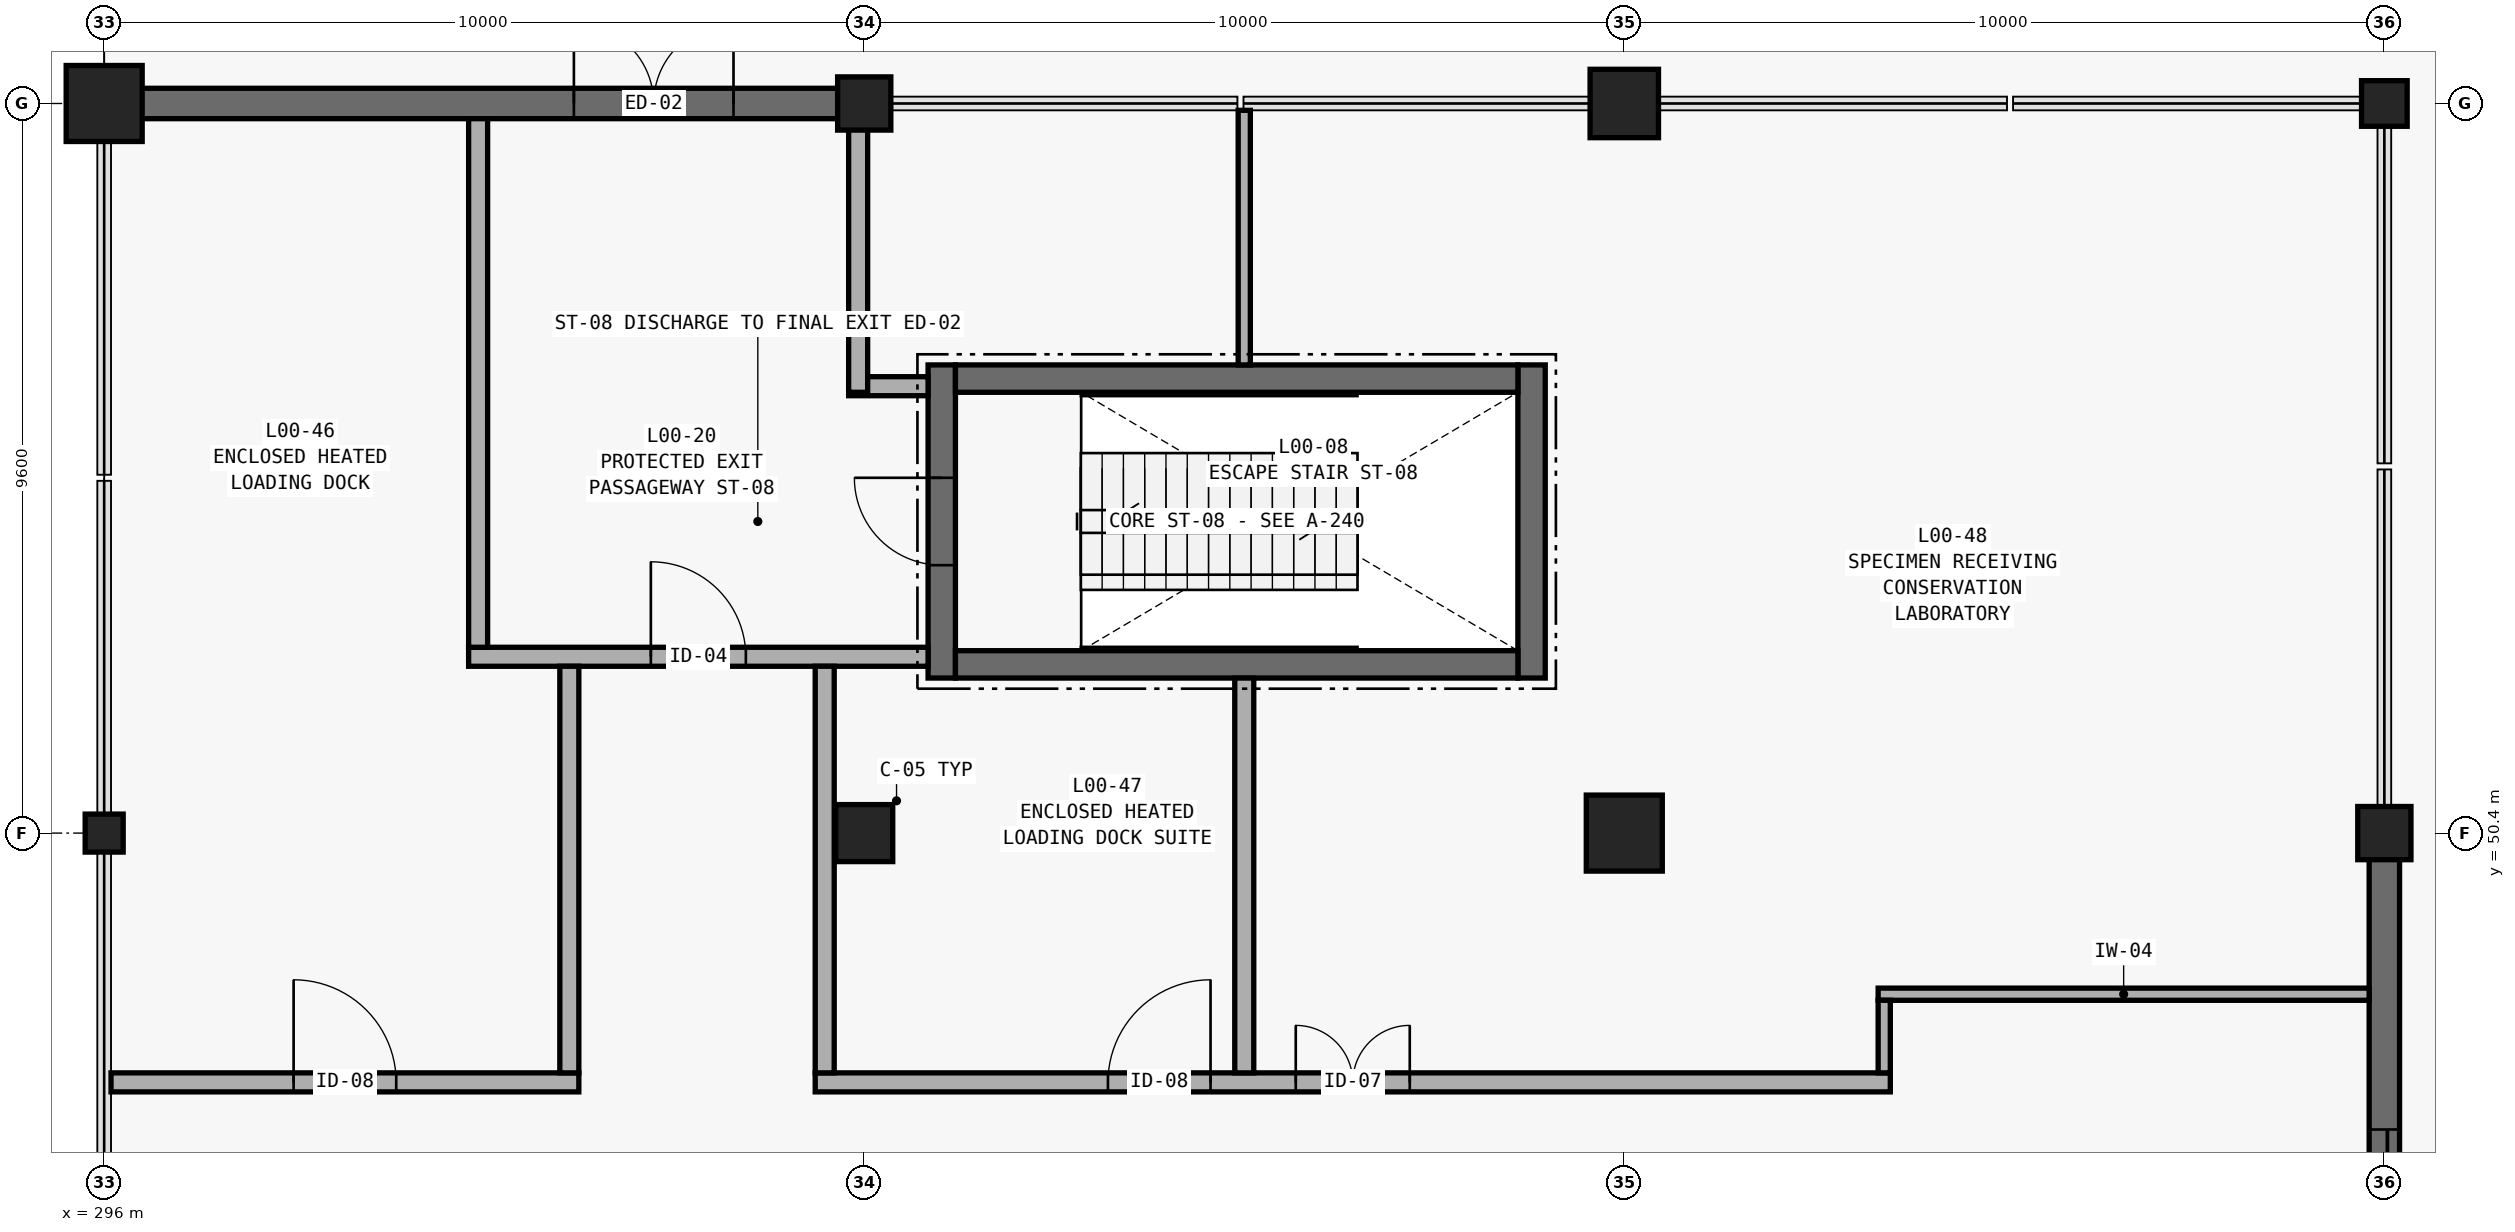
"""IFC4 building model, lengths in metres.
Left out: names, types, materials, properties, quantities, classifications, styles, units other than length and angle.
Written with IfcOpenShell. Run it as: python <this file> out.ifc"""

import sys

from ifc_helpers import new_model, si_unit, direction, frame, frame_2d, origin, origin_2d, place, context, subcontext, project, spatial, rectangle, extrude, element, fill, save


model = new_model("IFC4")
c1 = context("Model", 3, precision=1e-05, world=origin(), true_north=direction((0.0, 1.0)))
c2 = subcontext(c1, "Body", "Model", "MODEL_VIEW")
j1 = project(units=[si_unit("LENGTHUNIT", "METRE"), si_unit("PLANEANGLEUNIT", "RADIAN")], contexts=[c1])
p1 = place(None, origin())
s1 = spatial("IfcSite", under=j1, at=p1, CompositionType="ELEMENT")
p2 = place(p1, origin())
s2 = spatial("IfcBuilding", under=s1, at=p2, CompositionType="ELEMENT")
p3 = place(p2, origin())
s3 = spatial("IfcBuildingStorey", under=s2, at=p3, CompositionType="ELEMENT", Elevation=0.0)
p4 = place(p3, frame((296.0, 50.4, 0.0), z_axis=(0.0, 0.0, 1.0), x_axis=(1.0, 0.0, 0.0)))
e1 = element("IfcColumn", 1, at=p4, inside=s3, PredefinedType="COLUMN", context=c2, shape_type="SweptSolid", body=[
    extrude(rectangle(XDim=0.5, YDim=0.5, at=origin_2d()), origin(), (0.0, 0.0, 1.0), 4.8),
])
p5 = place(p3, frame((296.0, 60.0, 0.0), z_axis=(0.0, 0.0, 1.0), x_axis=(1.0, 0.0, 0.0)))
e2 = element("IfcColumn", 2, at=p5, inside=s3, PredefinedType="COLUMN", context=c2, shape_type="SweptSolid", body=[
    extrude(rectangle(XDim=1.0, YDim=1.0, at=origin_2d()), origin(), (0.0, 0.0, 1.0), 4.8),
])
p6 = place(p3, frame((306.0, 50.4, 0.0), z_axis=(0.0, 0.0, 1.0), x_axis=(1.0, 0.0, 0.0)))
e3 = element("IfcColumn", 3, at=p6, inside=s3, PredefinedType="COLUMN", context=c2, shape_type="SweptSolid", body=[
    extrude(rectangle(XDim=0.75, YDim=0.75, at=origin_2d()), origin(), (0.0, 0.0, 1.0), 4.8),
])
p7 = place(p3, frame((306.0, 60.0, 0.0), z_axis=(0.0, 0.0, 1.0), x_axis=(1.0, 0.0, 0.0)))
e4 = element("IfcColumn", 4, at=p7, inside=s3, PredefinedType="COLUMN", context=c2, shape_type="SweptSolid", body=[
    extrude(rectangle(XDim=0.7, YDim=0.7, at=origin_2d()), origin(), (0.0, 0.0, 1.0), 4.8),
])
p8 = place(p3, frame((316.0, 50.4, 0.0), z_axis=(0.0, 0.0, 1.0), x_axis=(1.0, 0.0, 0.0)))
e5 = element("IfcColumn", 5, at=p8, inside=s3, PredefinedType="COLUMN", context=c2, shape_type="SweptSolid", body=[
    extrude(rectangle(XDim=1.0, YDim=1.0, at=origin_2d()), origin(), (0.0, 0.0, 1.0), 4.8),
])
p9 = place(p3, frame((316.0, 60.0, 0.0), z_axis=(0.0, 0.0, 1.0), x_axis=(1.0, 0.0, 0.0)))
e6 = element("IfcColumn", 6, at=p9, inside=s3, PredefinedType="COLUMN", context=c2, shape_type="SweptSolid", body=[
    extrude(rectangle(XDim=0.9, YDim=0.9, at=origin_2d()), origin(), (0.0, 0.0, 1.0), 4.8),
])
p10 = place(p3, frame((326.0, 50.4, 0.0), z_axis=(0.0, 0.0, 1.0), x_axis=(1.0, 0.0, 0.0)))
e7 = element("IfcColumn", 7, at=p10, inside=s3, PredefinedType="COLUMN", context=c2, shape_type="SweptSolid", body=[
    extrude(rectangle(XDim=0.7, YDim=0.7, at=origin_2d()), origin(), (0.0, 0.0, 1.0), 4.8),
])
p11 = place(p3, frame((326.0, 60.0, 0.0), z_axis=(0.0, 0.0, 1.0), x_axis=(1.0, 0.0, 0.0)))
e8 = element("IfcColumn", 8, at=p11, inside=s3, PredefinedType="COLUMN", context=c2, shape_type="SweptSolid", body=[
    extrude(rectangle(XDim=0.6, YDim=0.6, at=origin_2d()), origin(), (0.0, 0.0, 1.0), 4.8),
])
p12 = place(p3, frame((326.0, 38.22, 0.0), z_axis=(0.0, 0.0, 1.0), x_axis=(0.0, 1.0, 0.0)))
e9 = element("IfcWall", 9, at=p12, inside=s3, PredefinedType="STANDARD", context=c2, shape_type="SweptSolid", body=[
    extrude(rectangle(XDim=12.36, YDim=0.4, at=frame_2d((6.18, 0.0))), origin(), (0.0, 0.0, 1.0), 4.5),
])
p13 = place(p12, frame((4.08, 0.0, 0.0)))
e10 = element("IfcOpeningElement", 10, at=p13, cuts=e9, PredefinedType="OPENING", context=c2, shape_type="SweptSolid", body=[
    extrude(rectangle(XDim=4.2, YDim=2.95, at=frame_2d((2.1, 1.475))), frame((0.0, 0.215, 0.0), z_axis=(0.0, -1.0, 0.0), x_axis=(1.0, 0.0, 0.0)), (0.0, 0.0, 1.0), 0.43),
])
p14 = place(p3, frame((306.18, 60.0, 0.0), z_axis=(0.0, 0.0, 1.0), x_axis=(-1.0, 0.0, 0.0)))
e11 = element("IfcWall", 11, at=p14, inside=s3, PredefinedType="STANDARD", context=c2, shape_type="SweptSolid", body=[
    extrude(rectangle(XDim=10.36, YDim=0.4, at=frame_2d((5.18, 0.0))), origin(), (0.0, 0.0, 1.0), 4.5),
])
p15 = place(p14, frame((1.9, 0.0, 0.0)))
e12 = element("IfcOpeningElement", 12, at=p15, cuts=e11, PredefinedType="OPENING", context=c2, shape_type="SweptSolid", body=[
    extrude(rectangle(XDim=2.1, YDim=2.6, at=frame_2d((1.05, 1.3))), frame((0.0, 0.215, 0.0), z_axis=(0.0, -1.0, 0.0), x_axis=(1.0, 0.0, 0.0)), (0.0, 0.0, 1.0), 0.43),
])
p16 = place(p3, frame((307.02, 52.44, 0.0), z_axis=(0.0, 0.0, 1.0), x_axis=(0.0, 1.0, 0.0)))
e13 = element("IfcWall", 13, at=p16, inside=s3, PredefinedType="SHEAR", context=c2, shape_type="SweptSolid", body=[
    extrude(rectangle(XDim=4.12, YDim=0.36, at=frame_2d((2.06, 0.0))), origin(), (0.0, 0.0, 1.0), 4.5),
])
p17 = place(p16, frame((1.485, 0.0, 0.0)))
e14 = element("IfcOpeningElement", 14, at=p17, cuts=e13, PredefinedType="OPENING", context=c2, shape_type="SweptSolid", body=[
    extrude(rectangle(XDim=1.15, YDim=2.15, at=frame_2d((0.575, 1.075))), frame((0.0, 0.195, 0.0), z_axis=(0.0, -1.0, 0.0), x_axis=(1.0, 0.0, 0.0)), (0.0, 0.0, 1.0), 0.39),
])
p18 = place(p3, frame((314.78, 52.44, 0.0), z_axis=(0.0, 0.0, 1.0), x_axis=(0.0, 1.0, 0.0)))
e15 = element("IfcWall", 15, at=p18, inside=s3, PredefinedType="SHEAR", context=c2, shape_type="SweptSolid", body=[
    extrude(rectangle(XDim=4.12, YDim=0.36, at=frame_2d((2.06, 0.0))), origin(), (0.0, 0.0, 1.0), 4.5),
])
for number, where, z_axis, x_axis in (
    (16, (307.2, 56.38, 0.0), (0.0, 0.0, 1.0), (1.0, 0.0, 0.0)),
    (17, (307.2, 52.62, 0.0), (0.0, 0.0, 1.0), (1.0, 0.0, 0.0)),
):
    element("IfcWall", number, at=place(p3, frame(where, z_axis=z_axis, x_axis=x_axis)), inside=s3, PredefinedType="SHEAR", context=c2, shape_type="SweptSolid", body=[
        extrude(rectangle(XDim=7.4, YDim=0.36, at=frame_2d((3.7, 0.0))), origin(), (0.0, 0.0, 1.0), 4.5),
    ])
p19 = place(p3, frame((296.09, 47.12, 0.0), z_axis=(0.0, 0.0, 1.0), x_axis=(1.0, 0.0, 0.0)))
e18 = element("IfcWall", 18, at=p19, inside=s3, PredefinedType="PARTITIONING", context=c2, shape_type="SweptSolid", body=[
    extrude(rectangle(XDim=6.155, YDim=0.25, at=frame_2d((3.078, 0.0))), origin(), (0.0, 0.0, 1.0), 3.38),
])
p20 = place(p19, frame((2.403, 0.0, 0.0)))
e19 = element("IfcOpeningElement", 19, at=p20, cuts=e18, PredefinedType="OPENING", context=c2, shape_type="SweptSolid", body=[
    extrude(rectangle(XDim=1.35, YDim=2.2, at=frame_2d((0.675, 1.1))), frame((0.0, 0.14, 0.0), z_axis=(0.0, -1.0, 0.0), x_axis=(1.0, 0.0, 0.0)), (0.0, 0.0, 1.0), 0.28),
])
p21 = place(p3, frame((305.355, 47.12, 0.0), z_axis=(0.0, 0.0, 1.0), x_axis=(1.0, 0.0, 0.0)))
e20 = element("IfcWall", 20, at=p21, inside=s3, PredefinedType="PARTITIONING", context=c2, shape_type="SweptSolid", body=[
    extrude(rectangle(XDim=14.145, YDim=0.25, at=frame_2d((7.073, 0.0))), origin(), (0.0, 0.0, 1.0), 3.38),
])
p22 = place(p21, frame((3.851, 0.0, 0.0)))
e21 = element("IfcOpeningElement", 21, at=p22, cuts=e20, PredefinedType="OPENING", context=c2, shape_type="SweptSolid", body=[
    extrude(rectangle(XDim=1.35, YDim=2.2, at=frame_2d((0.675, 1.1))), frame((0.0, 0.14, 0.0), z_axis=(0.0, -1.0, 0.0), x_axis=(1.0, 0.0, 0.0)), (0.0, 0.0, 1.0), 0.28),
])
p23 = place(p21, frame((6.323, 0.0, 0.0)))
e22 = element("IfcOpeningElement", 22, at=p23, cuts=e20, PredefinedType="OPENING", context=c2, shape_type="SweptSolid", body=[
    extrude(rectangle(XDim=1.5, YDim=2.2, at=frame_2d((0.75, 1.1))), frame((0.0, 0.14, 0.0), z_axis=(0.0, -1.0, 0.0), x_axis=(1.0, 0.0, 0.0)), (0.0, 0.0, 1.0), 0.28),
])
p24 = place(p3, frame((319.34, 48.28, 0.0), z_axis=(0.0, 0.0, 1.0), x_axis=(1.0, 0.0, 0.0)))
e23 = element("IfcWall", 23, at=p24, inside=s3, PredefinedType="PARTITIONING", context=c2, shape_type="SweptSolid", body=[
    extrude(rectangle(XDim=6.46, YDim=0.16, at=frame_2d((3.23, 0.0))), origin(), (0.0, 0.0, 1.0), 3.38),
])
p25 = place(p3, frame((300.795, 52.72, 0.0), z_axis=(0.0, 0.0, 1.0), x_axis=(1.0, 0.0, 0.0)))
e24 = element("IfcWall", 24, at=p25, inside=s3, PredefinedType="PARTITIONING", context=c2, shape_type="SweptSolid", body=[
    extrude(rectangle(XDim=6.045, YDim=0.25, at=frame_2d((3.022, 0.0))), origin(), (0.0, 0.0, 1.0), 3.38),
])
p26 = place(p25, frame((2.397, 0.0, 0.0)))
e25 = element("IfcOpeningElement", 25, at=p26, cuts=e24, PredefinedType="OPENING", context=c2, shape_type="SweptSolid", body=[
    extrude(rectangle(XDim=1.25, YDim=2.15, at=frame_2d((0.625, 1.075))), frame((0.0, 0.14, 0.0), z_axis=(0.0, -1.0, 0.0), x_axis=(1.0, 0.0, 0.0)), (0.0, 0.0, 1.0), 0.28),
])
p27 = place(p3, frame((305.795, 56.28, 0.0), z_axis=(0.0, 0.0, 1.0), x_axis=(1.0, 0.0, 0.0)))
e26 = element("IfcWall", 26, at=p27, inside=s3, PredefinedType="PARTITIONING", context=c2, shape_type="SweptSolid", body=[
    extrude(rectangle(XDim=1.045, YDim=0.25, at=frame_2d((0.522, 0.0))), origin(), (0.0, 0.0, 1.0), 3.38),
])
p28 = place(p3, frame((300.92, 52.845, 0.0), z_axis=(0.0, 0.0, 1.0), x_axis=(0.0, 1.0, 0.0)))
e27 = element("IfcWall", 27, at=p28, inside=s3, PredefinedType="PARTITIONING", context=c2, shape_type="SweptSolid", body=[
    extrude(rectangle(XDim=6.955, YDim=0.25, at=frame_2d((3.478, 0.0))), origin(), (0.0, 0.0, 1.0), 3.38),
])
for number, where, z_axis, x_axis in (
    (28, (302.12, 47.245, 0.0), (0.0, 0.0, 1.0), (0.0, 1.0, 0.0)),
    (29, (305.48, 47.245, 0.0), (0.0, 0.0, 1.0), (0.0, 1.0, 0.0)),
):
    element("IfcWall", number, at=place(p3, frame(where, z_axis=z_axis, x_axis=x_axis)), inside=s3, PredefinedType="PARTITIONING", context=c2, shape_type="SweptSolid", body=[
        extrude(rectangle(XDim=5.35, YDim=0.25, at=frame_2d((2.675, 0.0))), origin(), (0.0, 0.0, 1.0), 3.38),
    ])
p29 = place(p3, frame((305.92, 56.2, 0.0), z_axis=(0.0, 0.0, 1.0), x_axis=(0.0, 1.0, 0.0)))
e30 = element("IfcWall", 30, at=p29, inside=s3, PredefinedType="PARTITIONING", context=c2, shape_type="SweptSolid", body=[
    extrude(rectangle(XDim=3.6, YDim=0.25, at=frame_2d((1.8, 0.0))), origin(), (0.0, 0.0, 1.0), 3.38),
])
p30 = place(p3, frame((311.0, 47.245, 0.0), z_axis=(0.0, 0.0, 1.0), x_axis=(0.0, 1.0, 0.0)))
e31 = element("IfcWall", 31, at=p30, inside=s3, PredefinedType="PARTITIONING", context=c2, shape_type="SweptSolid", body=[
    extrude(rectangle(XDim=5.195, YDim=0.25, at=frame_2d((2.597, 0.0))), origin(), (0.0, 0.0, 1.0), 3.38),
])
p31 = place(p3, frame((311.0, 56.56, 0.0), z_axis=(0.0, 0.0, 1.0), x_axis=(0.0, 1.0, 0.0)))
e32 = element("IfcWall", 32, at=p31, inside=s3, PredefinedType="PARTITIONING", context=c2, shape_type="SweptSolid", body=[
    extrude(rectangle(XDim=3.35, YDim=0.16, at=frame_2d((1.675, 0.0))), origin(), (0.0, 0.0, 1.0), 3.38),
])
p32 = place(p3, frame((319.42, 47.245, 0.0), z_axis=(0.0, 0.0, 1.0), x_axis=(0.0, 1.0, 0.0)))
e33 = element("IfcWall", 33, at=p32, inside=s3, PredefinedType="PARTITIONING", context=c2, shape_type="SweptSolid", body=[
    extrude(rectangle(XDim=0.955, YDim=0.16, at=frame_2d((0.478, 0.0))), origin(), (0.0, 0.0, 1.0), 3.38),
])
p33 = place(p13, frame((4.2, 0.0, 0.0), z_axis=(0.0, 0.0, 1.0), x_axis=(-1.0, 0.0, 0.0)))
e34 = element("IfcDoor", 34, at=p33, inside=s3, OperationType="ROLLINGUP", PredefinedType="GATE", context=c2, shape_type="SweptSolid", body=[
    extrude(rectangle(XDim=4.2, YDim=2.95, at=frame_2d((2.1, 1.475))), frame((0.0, 0.025, 0.0), z_axis=(0.0, -1.0, 0.0), x_axis=(1.0, 0.0, 0.0)), (0.0, 0.0, 1.0), 0.05),
])
fill(e10, e34)
p34 = place(p15, frame((2.1, 0.0, 0.0), z_axis=(0.0, 0.0, 1.0), x_axis=(-1.0, 0.0, 0.0)))
e35 = element("IfcDoor", 35, at=p34, inside=s3, OperationType="DOUBLE_DOOR_SINGLE_SWING", PredefinedType="DOOR", context=c2, shape_type="SweptSolid", body=[
    extrude(rectangle(XDim=2.1, YDim=2.6, at=frame_2d((1.05, 1.3))), frame((0.0, 0.025, 0.0), z_axis=(0.0, -1.0, 0.0), x_axis=(1.0, 0.0, 0.0)), (0.0, 0.0, 1.0), 0.05),
])
fill(e12, e35)
p35 = place(p17, origin())
e36 = element("IfcDoor", 36, at=p35, inside=s3, OperationType="SINGLE_SWING_RIGHT", PredefinedType="DOOR", context=c2, shape_type="SweptSolid", body=[
    extrude(rectangle(XDim=1.15, YDim=2.15, at=frame_2d((0.575, 1.075))), frame((0.0, 0.025, 0.0), z_axis=(0.0, -1.0, 0.0), x_axis=(1.0, 0.0, 0.0)), (0.0, 0.0, 1.0), 0.05),
])
fill(e14, e36)
p36 = place(p26, origin())
e37 = element("IfcDoor", 37, at=p36, inside=s3, OperationType="SINGLE_SWING_LEFT", PredefinedType="DOOR", context=c2, shape_type="SweptSolid", body=[
    extrude(rectangle(XDim=1.25, YDim=2.15, at=frame_2d((0.625, 1.075))), frame((0.0, 0.025, 0.0), z_axis=(0.0, -1.0, 0.0), x_axis=(1.0, 0.0, 0.0)), (0.0, 0.0, 1.0), 0.05),
])
fill(e25, e37)
p37 = place(p20, origin())
e38 = element("IfcDoor", 38, at=p37, inside=s3, OperationType="SINGLE_SWING_LEFT", PredefinedType="DOOR", context=c2, shape_type="SweptSolid", body=[
    extrude(rectangle(XDim=1.35, YDim=2.2, at=frame_2d((0.675, 1.1))), frame((0.0, 0.025, 0.0), z_axis=(0.0, -1.0, 0.0), x_axis=(1.0, 0.0, 0.0)), (0.0, 0.0, 1.0), 0.05),
])
fill(e19, e38)
p38 = place(p22, origin())
e39 = element("IfcDoor", 39, at=p38, inside=s3, OperationType="SINGLE_SWING_RIGHT", PredefinedType="DOOR", context=c2, shape_type="SweptSolid", body=[
    extrude(rectangle(XDim=1.35, YDim=2.2, at=frame_2d((0.675, 1.1))), frame((0.0, 0.025, 0.0), z_axis=(0.0, -1.0, 0.0), x_axis=(1.0, 0.0, 0.0)), (0.0, 0.0, 1.0), 0.05),
])
fill(e21, e39)
p39 = place(p23, origin())
e40 = element("IfcDoor", 40, at=p39, inside=s3, OperationType="DOUBLE_DOOR_SINGLE_SWING", PredefinedType="DOOR", context=c2, shape_type="SweptSolid", body=[
    extrude(rectangle(XDim=1.5, YDim=2.2, at=frame_2d((0.75, 1.1))), frame((0.0, 0.025, 0.0), z_axis=(0.0, -1.0, 0.0), x_axis=(1.0, 0.0, 0.0)), (0.0, 0.0, 1.0), 0.05),
])
fill(e22, e40)
save(model, sys.argv[1])
